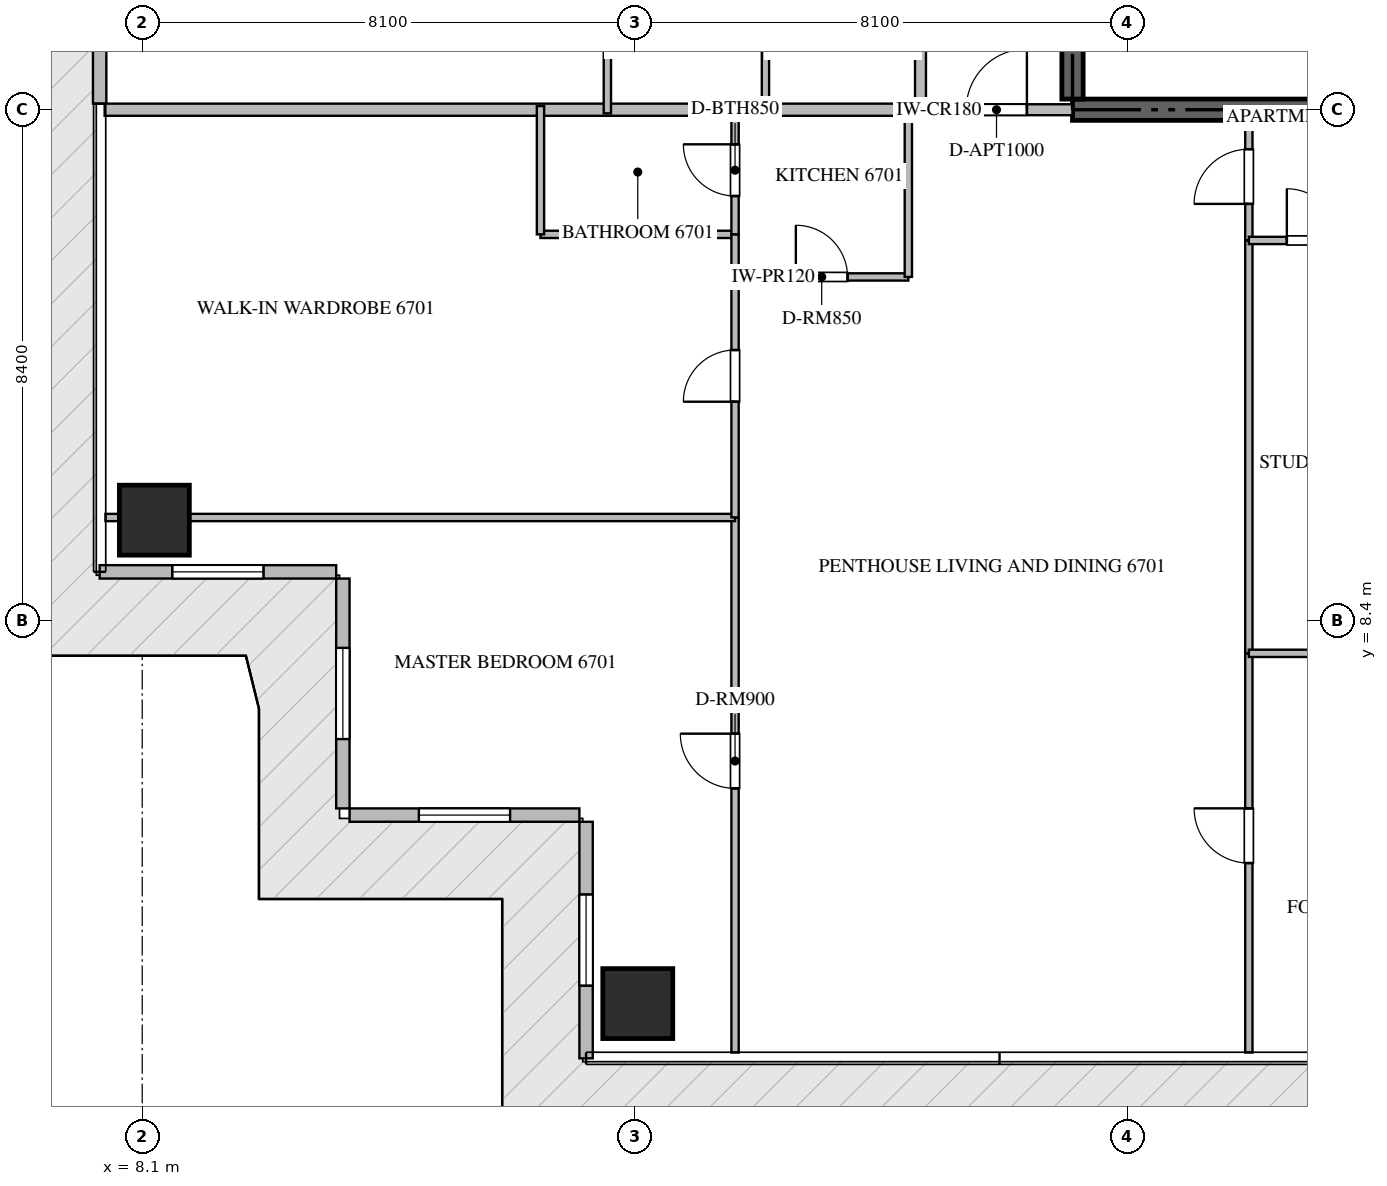
"""IFC4 building model, lengths in metres.
Left out: names, types, materials, properties, quantities, classifications, styles, units other than length and angle.
Written with IfcOpenShell. Run it as: python <this file> out.ifc"""

import sys

from ifc_helpers import new_model, si_unit, direction, frame, frame_2d, origin, origin_2d, place, context, subcontext, project, spatial, rectangle, extrude, source, transform, mapped, element, fill, save


model = new_model("IFC4")
c1 = context("Model", 3, precision=1e-05, world=origin(), true_north=direction((0.0, 1.0)))
c2 = subcontext(c1, "Body", "Model", "MODEL_VIEW")
j1 = project(units=[si_unit("LENGTHUNIT", "METRE"), si_unit("PLANEANGLEUNIT", "RADIAN")], contexts=[c1])
p1 = place(None, origin())
s1 = spatial("IfcSite", under=j1, at=p1, CompositionType="ELEMENT")
p2 = place(p1, origin())
s2 = spatial("IfcBuilding", under=s1, at=p2, CompositionType="ELEMENT")
p3 = place(p2, frame((0.0, 0.0, 268.2)))
s3 = spatial("IfcBuildingStorey", under=s2, at=p3, CompositionType="ELEMENT", Elevation=268.2)
p4 = place(p3, frame((23.4, 16.8, -0.26), z_axis=(0.0, 0.0, 1.0), x_axis=(1.0, 0.0, 0.0)))
e1 = element("IfcWall", 1, at=p4, inside=s3, PredefinedType="SHEAR", context=c2, shape_type="SweptSolid", body=[
    extrude(rectangle(XDim=18.0, YDim=0.35, at=frame_2d((9.0, 0.0))), origin(), (0.0, 0.0, 1.0), 3.848),
])
p5 = place(p3, frame((23.4, 16.975, -0.26), z_axis=(0.0, 0.0, 1.0), x_axis=(0.0, 1.0, 0.0)))
e2 = element("IfcWall", 2, at=p5, inside=s3, PredefinedType="SHEAR", context=c2, shape_type="SweptSolid", body=[
    extrude(rectangle(XDim=4.875, YDim=0.35, at=frame_2d((2.438, 0.0))), origin(), (0.0, 0.0, 1.0), 3.848),
])
m1 = source(origin(), c2, "Body", "SweptSolid", [
    extrude(rectangle(XDim=1.15, YDim=1.15, at=origin_2d()), origin(), (0.0, 0.0, 1.0), 3.85),
])
for number, where, z_axis, x_axis in (
    (3, (16.25, 2.1, -0.26), (0.0, 0.0, 1.0), (1.0, 0.0, 0.0)),
    (4, (8.3, 10.05, -0.26), (0.0, 0.0, 1.0), (1.0, 0.0, 0.0)),
):
    element("IfcColumn", number, at=place(p3, frame(where, z_axis=z_axis, x_axis=x_axis)), inside=s3, PredefinedType="COLUMN", context=c2, shape_type="MappedRepresentation", body=[
        mapped(m1, transform((0.0, 0.0, 0.0), scale=1.0)),
    ])
p6 = place(p3, frame((7.4, 19.9, 0.0), z_axis=(0.0, 0.0, 1.0), x_axis=(0.0, -1.0, 0.0)))
e5 = element("IfcWall", 5, at=p6, inside=s3, PredefinedType="ELEMENTEDWALL", context=c2, shape_type="SweptSolid", body=[
    extrude(rectangle(XDim=3.0, YDim=0.22, at=frame_2d((1.5, 0.0))), origin(), (0.0, 0.0, 1.0), 3.575),
])
p7 = place(p6, frame((0.95, 0.0, 0.0)))
e6 = element("IfcOpeningElement", 6, at=p7, cuts=e5, PredefinedType="OPENING", context=c2, shape_type="SweptSolid", body=[
    extrude(rectangle(XDim=1.1, YDim=2.2, at=frame_2d((0.55, 1.1))), frame((0.0, 0.12, 0.0), z_axis=(0.0, -1.0, 0.0), x_axis=(1.0, 0.0, 0.0)), (0.0, 0.0, 1.0), 0.24),
])
p8 = place(p3, frame((7.4, 9.2, 0.0), z_axis=(0.0, 0.0, 1.0), x_axis=(1.0, 0.0, 0.0)))
e7 = element("IfcWall", 7, at=p8, inside=s3, PredefinedType="ELEMENTEDWALL", context=c2, shape_type="SweptSolid", body=[
    extrude(rectangle(XDim=3.89, YDim=0.22, at=frame_2d((1.945, 0.0))), origin(), (0.0, 0.0, 1.0), 3.575),
])
p9 = place(p8, frame((1.195, 0.0, 0.65)))
e8 = element("IfcOpeningElement", 8, at=p9, cuts=e7, PredefinedType="OPENING", context=c2, shape_type="SweptSolid", body=[
    extrude(rectangle(XDim=1.5, YDim=2.25, at=frame_2d((0.75, 1.125))), frame((0.0, 0.12, 0.0), z_axis=(0.0, -1.0, 0.0), x_axis=(1.0, 0.0, 0.0)), (0.0, 0.0, 1.0), 0.24),
])
p10 = place(p3, frame((11.4, 9.09, 0.0), z_axis=(0.0, 0.0, 1.0), x_axis=(0.0, -1.0, 0.0)))
e9 = element("IfcWall", 9, at=p10, inside=s3, PredefinedType="ELEMENTEDWALL", context=c2, shape_type="SweptSolid", body=[
    extrude(rectangle(XDim=3.78, YDim=0.22, at=frame_2d((1.89, 0.0))), origin(), (0.0, 0.0, 1.0), 3.575),
])
p11 = place(p10, frame((1.14, 0.0, 0.65)))
e10 = element("IfcOpeningElement", 10, at=p11, cuts=e9, PredefinedType="OPENING", context=c2, shape_type="SweptSolid", body=[
    extrude(rectangle(XDim=1.5, YDim=2.25, at=frame_2d((0.75, 1.125))), frame((0.0, 0.12, 0.0), z_axis=(0.0, -1.0, 0.0), x_axis=(1.0, 0.0, 0.0)), (0.0, 0.0, 1.0), 0.24),
])
p12 = place(p3, frame((11.51, 5.2, 0.0), z_axis=(0.0, 0.0, 1.0), x_axis=(1.0, 0.0, 0.0)))
e11 = element("IfcWall", 11, at=p12, inside=s3, PredefinedType="ELEMENTEDWALL", context=c2, shape_type="SweptSolid", body=[
    extrude(rectangle(XDim=3.78, YDim=0.22, at=frame_2d((1.89, 0.0))), origin(), (0.0, 0.0, 1.0), 3.575),
])
p13 = place(p12, frame((1.14, 0.0, 0.65)))
e12 = element("IfcOpeningElement", 12, at=p13, cuts=e11, PredefinedType="OPENING", context=c2, shape_type="SweptSolid", body=[
    extrude(rectangle(XDim=1.5, YDim=2.25, at=frame_2d((0.75, 1.125))), frame((0.0, 0.12, 0.0), z_axis=(0.0, -1.0, 0.0), x_axis=(1.0, 0.0, 0.0)), (0.0, 0.0, 1.0), 0.24),
])
p14 = place(p3, frame((15.4, 5.09, 0.0), z_axis=(0.0, 0.0, 1.0), x_axis=(0.0, -1.0, 0.0)))
e13 = element("IfcWall", 13, at=p14, inside=s3, PredefinedType="ELEMENTEDWALL", context=c2, shape_type="SweptSolid", body=[
    extrude(rectangle(XDim=3.89, YDim=0.22, at=frame_2d((1.945, 0.0))), origin(), (0.0, 0.0, 1.0), 3.575),
])
p15 = place(p14, frame((1.195, 0.0, 0.65)))
e14 = element("IfcOpeningElement", 14, at=p15, cuts=e13, PredefinedType="OPENING", context=c2, shape_type="SweptSolid", body=[
    extrude(rectangle(XDim=1.5, YDim=2.25, at=frame_2d((0.75, 1.125))), frame((0.0, 0.12, 0.0), z_axis=(0.0, -1.0, 0.0), x_axis=(1.0, 0.0, 0.0)), (0.0, 0.0, 1.0), 0.24),
])
p16 = place(p3, frame((7.482, 16.8, 0.0), z_axis=(0.0, 0.0, 1.0), x_axis=(1.0, 0.0, 0.0)))
e15 = element("IfcWall", 15, at=p16, inside=s3, PredefinedType="PARTITIONING", context=c2, shape_type="SweptSolid", body=[
    extrude(rectangle(XDim=13.418, YDim=0.2, at=frame_2d((6.709, 0.0))), origin(), (0.0, 0.0, 1.0), 3.59),
])
p17 = place(p3, frame((20.902, 16.8, 0.0), z_axis=(0.0, 0.0, 1.0), x_axis=(1.0, 0.0, 0.0)))
e16 = element("IfcWall", 16, at=p17, inside=s3, PredefinedType="PARTITIONING", context=c2, shape_type="SweptSolid", body=[
    extrude(rectangle(XDim=2.496, YDim=0.18, at=frame_2d((1.248, 0.0))), origin(), (0.0, 0.0, 1.0), 3.59),
])
p18 = place(p17, frame((0.748, 0.0, 0.0)))
e17 = element("IfcOpeningElement", 17, at=p18, cuts=e16, PredefinedType="OPENING", context=c2, shape_type="SweptSolid", body=[
    extrude(rectangle(XDim=1.0, YDim=2.15, at=frame_2d((0.5, 1.075))), frame((0.0, 0.1, 0.0), z_axis=(0.0, -1.0, 0.0), x_axis=(1.0, 0.0, 0.0)), (0.0, 0.0, 1.0), 0.2),
])
p19 = place(p3, frame((20.9, 16.8, 0.0), z_axis=(0.0, 0.0, 1.0), x_axis=(0.0, 1.0, 0.0)))
e18 = element("IfcWall", 18, at=p19, inside=s3, PredefinedType="PARTITIONING", context=c2, shape_type="SweptSolid", body=[
    extrude(rectangle(XDim=16.8, YDim=0.18, at=frame_2d((8.4, 0.0))), origin(), (0.0, 0.0, 1.0), 3.59),
])
p20 = place(p19, frame((4.503, 0.0, 0.0)))
e19 = element("IfcOpeningElement", 19, at=p20, cuts=e18, PredefinedType="OPENING", context=c2, shape_type="SweptSolid", body=[
    extrude(rectangle(XDim=1.0, YDim=2.15, at=frame_2d((0.5, 1.075))), frame((0.0, 0.1, 0.0), z_axis=(0.0, -1.0, 0.0), x_axis=(1.0, 0.0, 0.0)), (0.0, 0.0, 1.0), 0.2),
])
p21 = place(p19, frame((8.706, 0.0, 0.0)))
e20 = element("IfcOpeningElement", 20, at=p21, cuts=e18, PredefinedType="OPENING", context=c2, shape_type="SweptSolid", body=[
    extrude(rectangle(XDim=1.0, YDim=2.15, at=frame_2d((0.5, 1.075))), frame((0.0, 0.1, 0.0), z_axis=(0.0, -1.0, 0.0), x_axis=(1.0, 0.0, 0.0)), (0.0, 0.0, 1.0), 0.2),
])
p22 = place(p3, frame((17.85, 14.05, 0.0), z_axis=(0.0, 0.0, 1.0), x_axis=(1.0, 0.0, 0.0)))
e21 = element("IfcWall", 21, at=p22, inside=s3, PredefinedType="PARTITIONING", context=c2, shape_type="SweptSolid", body=[
    extrude(rectangle(XDim=2.85, YDim=0.12, at=frame_2d((1.425, 0.0))), origin(), (0.0, 0.0, 1.0), 3.59),
])
p23 = place(p22, frame((1.0, 0.0, 0.0)))
e22 = element("IfcOpeningElement", 22, at=p23, cuts=e21, PredefinedType="OPENING", context=c2, shape_type="SweptSolid", body=[
    extrude(rectangle(XDim=0.85, YDim=2.1, at=frame_2d((0.425, 1.05))), frame((0.0, 0.07, 0.0), z_axis=(0.0, -1.0, 0.0), x_axis=(1.0, 0.0, 0.0)), (0.0, 0.0, 1.0), 0.14),
])
p24 = place(p3, frame((20.7, 14.05, 0.0), z_axis=(0.0, 0.0, 1.0), x_axis=(0.0, 1.0, 0.0)))
e23 = element("IfcWall", 23, at=p24, inside=s3, PredefinedType="PARTITIONING", context=c2, shape_type="SweptSolid", body=[
    extrude(rectangle(XDim=2.81, YDim=0.12, at=frame_2d((1.405, 0.0))), origin(), (0.0, 0.0, 1.0), 3.59),
])
p25 = place(p3, frame((17.85, 1.295, 0.0), z_axis=(0.0, 0.0, 1.0), x_axis=(0.0, 1.0, 0.0)))
e24 = element("IfcWall", 24, at=p25, inside=s3, PredefinedType="PARTITIONING", context=c2, shape_type="SweptSolid", body=[
    extrude(rectangle(XDim=8.799, YDim=0.12, at=frame_2d((4.399, 0.0))), origin(), (0.0, 0.0, 1.0), 3.59),
])
p26 = place(p25, frame((4.344, 0.0, 0.0)))
e25 = element("IfcOpeningElement", 25, at=p26, cuts=e24, PredefinedType="OPENING", context=c2, shape_type="SweptSolid", body=[
    extrude(rectangle(XDim=0.9, YDim=2.1, at=frame_2d((0.45, 1.05))), frame((0.0, 0.07, 0.0), z_axis=(0.0, -1.0, 0.0), x_axis=(1.0, 0.0, 0.0)), (0.0, 0.0, 1.0), 0.14),
])
p27 = place(p3, frame((7.495, 10.094, 0.0), z_axis=(0.0, 0.0, 1.0), x_axis=(1.0, 0.0, 0.0)))
e26 = element("IfcWall", 26, at=p27, inside=s3, PredefinedType="PARTITIONING", context=c2, shape_type="SweptSolid", body=[
    extrude(rectangle(XDim=10.355, YDim=0.12, at=frame_2d((5.177, 0.0))), origin(), (0.0, 0.0, 1.0), 3.122),
])
p28 = place(p3, frame((14.65, 14.75, 0.0), z_axis=(0.0, 0.0, 1.0), x_axis=(1.0, 0.0, 0.0)))
e27 = element("IfcWall", 27, at=p28, inside=s3, PredefinedType="PARTITIONING", context=c2, shape_type="SweptSolid", body=[
    extrude(rectangle(XDim=3.2, YDim=0.12, at=frame_2d((1.6, 0.0))), origin(), (0.0, 0.0, 1.0), 3.59),
])
p29 = place(p3, frame((14.65, 14.75, 0.0), z_axis=(0.0, 0.0, 1.0), x_axis=(0.0, 1.0, 0.0)))
e28 = element("IfcWall", 28, at=p29, inside=s3, PredefinedType="PARTITIONING", context=c2, shape_type="SweptSolid", body=[
    extrude(rectangle(XDim=2.11, YDim=0.12, at=frame_2d((1.055, 0.0))), origin(), (0.0, 0.0, 1.0), 3.59),
])
p30 = place(p3, frame((17.85, 10.096, 0.0), z_axis=(0.0, 0.0, 1.0), x_axis=(0.0, 1.0, 0.0)))
e29 = element("IfcWall", 29, at=p30, inside=s3, PredefinedType="PARTITIONING", context=c2, shape_type="SweptSolid", body=[
    extrude(rectangle(XDim=4.654, YDim=0.12, at=frame_2d((2.327, 0.0))), origin(), (0.0, 0.0, 1.0), 3.59),
])
p31 = place(p30, frame((1.902, 0.0, 0.0)))
e30 = element("IfcOpeningElement", 30, at=p31, cuts=e29, PredefinedType="OPENING", context=c2, shape_type="SweptSolid", body=[
    extrude(rectangle(XDim=0.85, YDim=2.1, at=frame_2d((0.425, 1.05))), frame((0.0, 0.07, 0.0), z_axis=(0.0, -1.0, 0.0), x_axis=(1.0, 0.0, 0.0)), (0.0, 0.0, 1.0), 0.14),
])
p32 = place(p3, frame((17.85, 14.752, 0.0), z_axis=(0.0, 0.0, 1.0), x_axis=(0.0, 1.0, 0.0)))
e31 = element("IfcWall", 31, at=p32, inside=s3, PredefinedType="PARTITIONING", context=c2, shape_type="SweptSolid", body=[
    extrude(rectangle(XDim=2.108, YDim=0.12, at=frame_2d((1.054, 0.0))), origin(), (0.0, 0.0, 1.0), 3.59),
])
p33 = place(p32, frame((0.629, 0.0, 0.0)))
e32 = element("IfcOpeningElement", 32, at=p33, cuts=e31, PredefinedType="OPENING", context=c2, shape_type="SweptSolid", body=[
    extrude(rectangle(XDim=0.85, YDim=2.1, at=frame_2d((0.425, 1.05))), frame((0.0, 0.07, 0.0), z_axis=(0.0, -1.0, 0.0), x_axis=(1.0, 0.0, 0.0)), (0.0, 0.0, 1.0), 0.14),
])
p34 = place(p3, frame((26.3, 14.65, 0.0), z_axis=(0.0, 0.0, 1.0), x_axis=(0.0, 1.0, 0.0)))
e33 = element("IfcWall", 33, at=p34, inside=s3, PredefinedType="PARTITIONING", context=c2, shape_type="SweptSolid", body=[
    extrude(rectangle(XDim=1.975, YDim=0.12, at=frame_2d((0.988, 0.0))), origin(), (0.0, 0.0, 1.0), 3.59),
])
p35 = place(p34, frame((0.601, 0.0, 0.0)))
e34 = element("IfcOpeningElement", 34, at=p35, cuts=e33, PredefinedType="OPENING", context=c2, shape_type="SweptSolid", body=[
    extrude(rectangle(XDim=0.9, YDim=2.1, at=frame_2d((0.45, 1.05))), frame((0.0, 0.07, 0.0), z_axis=(0.0, -1.0, 0.0), x_axis=(1.0, 0.0, 0.0)), (0.0, 0.0, 1.0), 0.14),
])
p36 = place(p3, frame((26.3, 1.295, 0.0), z_axis=(0.0, 0.0, 1.0), x_axis=(0.0, 1.0, 0.0)))
e35 = element("IfcWall", 35, at=p36, inside=s3, PredefinedType="PARTITIONING", context=c2, shape_type="SweptSolid", body=[
    extrude(rectangle(XDim=6.565, YDim=0.12, at=frame_2d((3.283, 0.0))), origin(), (0.0, 0.0, 1.0), 3.59),
])
p37 = place(p36, frame((3.116, 0.0, 0.0)))
e36 = element("IfcOpeningElement", 36, at=p37, cuts=e35, PredefinedType="OPENING", context=c2, shape_type="SweptSolid", body=[
    extrude(rectangle(XDim=0.9, YDim=2.1, at=frame_2d((0.45, 1.05))), frame((0.0, 0.07, 0.0), z_axis=(0.0, -1.0, 0.0), x_axis=(1.0, 0.0, 0.0)), (0.0, 0.0, 1.0), 0.14),
])
p38 = place(p3, frame((26.3, 7.862, 0.0), z_axis=(0.0, 0.0, 1.0), x_axis=(0.0, 1.0, 0.0)))
e37 = element("IfcWall", 37, at=p38, inside=s3, PredefinedType="PARTITIONING", context=c2, shape_type="SweptSolid", body=[
    extrude(rectangle(XDim=6.786, YDim=0.12, at=frame_2d((3.393, 0.0))), origin(), (0.0, 0.0, 1.0), 3.59),
])
p39 = place(p3, frame((26.3, 7.86, 0.0), z_axis=(0.0, 0.0, 1.0), x_axis=(1.0, 0.0, 0.0)))
e38 = element("IfcWall", 38, at=p39, inside=s3, PredefinedType="PARTITIONING", context=c2, shape_type="SweptSolid", body=[
    extrude(rectangle(XDim=5.15, YDim=0.12, at=frame_2d((2.575, 0.0))), origin(), (0.0, 0.0, 1.0), 3.59),
])
p40 = place(p3, frame((26.3, 14.65, 0.0), z_axis=(0.0, 0.0, 1.0), x_axis=(1.0, 0.0, 0.0)))
e39 = element("IfcWall", 39, at=p40, inside=s3, PredefinedType="PARTITIONING", context=c2, shape_type="SweptSolid", body=[
    extrude(rectangle(XDim=2.1, YDim=0.12, at=frame_2d((1.05, 0.0))), origin(), (0.0, 0.0, 1.0), 3.59),
])
p41 = place(p40, frame((0.625, 0.0, 0.0)))
e40 = element("IfcOpeningElement", 40, at=p41, cuts=e39, PredefinedType="OPENING", context=c2, shape_type="SweptSolid", body=[
    extrude(rectangle(XDim=0.85, YDim=2.1, at=frame_2d((0.425, 1.05))), frame((0.0, 0.07, 0.0), z_axis=(0.0, -1.0, 0.0), x_axis=(1.0, 0.0, 0.0)), (0.0, 0.0, 1.0), 0.14),
])
for number, where, z_axis, x_axis in (
    (41, (18.35, 16.74, 0.0), (0.0, 0.0, 1.0), (0.0, 1.0, 0.0)),
    (42, (15.75, 16.74, 0.0), (0.0, 0.0, 1.0), (0.0, 1.0, 0.0)),
):
    element("IfcWall", number, at=place(p3, frame(where, z_axis=z_axis, x_axis=x_axis)), inside=s3, PredefinedType="PARTITIONING", context=c2, shape_type="SweptSolid", body=[
        extrude(rectangle(XDim=2.66, YDim=0.12, at=frame_2d((1.33, 0.0))), origin(), (0.0, 0.0, 1.0), 3.59),
    ])
m2 = source(origin(), c2, "Body", "SweptSolid", [
    extrude(rectangle(XDim=1.5, YDim=2.25, at=frame_2d((0.75, 1.125))), frame((0.0, 0.03, 0.0), z_axis=(0.0, -1.0, 0.0), x_axis=(1.0, 0.0, 0.0)), (0.0, 0.0, 1.0), 0.06),
])
p42 = place(p9, origin())
e43 = element("IfcWindow", 43, at=p42, inside=s3, PartitioningType="SINGLE_PANEL", PredefinedType="WINDOW", context=c2, shape_type="MappedRepresentation", body=[
    mapped(m2, transform((0.0, 0.0, 0.0), scale=1.0)),
])
fill(e8, e43)
p43 = place(p11, origin())
e44 = element("IfcWindow", 44, at=p43, inside=s3, PartitioningType="SINGLE_PANEL", PredefinedType="WINDOW", context=c2, shape_type="MappedRepresentation", body=[
    mapped(m2, transform((0.0, 0.0, 0.0), scale=1.0)),
])
fill(e10, e44)
p44 = place(p13, origin())
e45 = element("IfcWindow", 45, at=p44, inside=s3, PartitioningType="SINGLE_PANEL", PredefinedType="WINDOW", context=c2, shape_type="MappedRepresentation", body=[
    mapped(m2, transform((0.0, 0.0, 0.0), scale=1.0)),
])
fill(e12, e45)
p45 = place(p15, origin())
e46 = element("IfcWindow", 46, at=p45, inside=s3, PartitioningType="SINGLE_PANEL", PredefinedType="WINDOW", context=c2, shape_type="MappedRepresentation", body=[
    mapped(m2, transform((0.0, 0.0, 0.0), scale=1.0)),
])
fill(e14, e46)
m3 = source(origin(), c2, "Body", "SweptSolid", [
    extrude(rectangle(XDim=1.0, YDim=2.15, at=frame_2d((0.5, 1.075))), frame((0.0, 0.025, 0.0), z_axis=(0.0, -1.0, 0.0), x_axis=(1.0, 0.0, 0.0)), (0.0, 0.0, 1.0), 0.05),
])
p46 = place(p18, origin())
e47 = element("IfcDoor", 47, at=p46, inside=s3, OperationType="SINGLE_SWING_RIGHT", PredefinedType="DOOR", context=c2, shape_type="MappedRepresentation", body=[
    mapped(m3, transform((0.0, 0.0, 0.0), scale=1.0)),
])
fill(e17, e47)
m4 = source(origin(), c2, "Body", "SweptSolid", [
    extrude(rectangle(XDim=0.85, YDim=2.1, at=frame_2d((0.425, 1.05))), frame((0.0, 0.025, 0.0), z_axis=(0.0, -1.0, 0.0), x_axis=(1.0, 0.0, 0.0)), (0.0, 0.0, 1.0), 0.05),
])
p47 = place(p23, origin())
e48 = element("IfcDoor", 48, at=p47, inside=s3, OperationType="SINGLE_SWING_LEFT", PredefinedType="DOOR", context=c2, shape_type="MappedRepresentation", body=[
    mapped(m4, transform((0.0, 0.0, 0.0), scale=1.0)),
])
fill(e22, e48)
m5 = source(origin(), c2, "Body", "SweptSolid", [
    extrude(rectangle(XDim=0.9, YDim=2.1, at=frame_2d((0.45, 1.05))), frame((0.0, 0.025, 0.0), z_axis=(0.0, -1.0, 0.0), x_axis=(1.0, 0.0, 0.0)), (0.0, 0.0, 1.0), 0.05),
])
p48 = place(p26, origin())
e49 = element("IfcDoor", 49, at=p48, inside=s3, OperationType="SINGLE_SWING_RIGHT", PredefinedType="DOOR", context=c2, shape_type="MappedRepresentation", body=[
    mapped(m5, transform((0.0, 0.0, 0.0), scale=1.0)),
])
fill(e25, e49)
p49 = place(p31, origin())
e50 = element("IfcDoor", 50, at=p49, inside=s3, OperationType="SINGLE_SWING_LEFT", PredefinedType="DOOR", context=c2, shape_type="MappedRepresentation", body=[
    mapped(m4, transform((0.0, 0.0, 0.0), scale=1.0)),
])
fill(e30, e50)
p50 = place(p33, origin())
e51 = element("IfcDoor", 51, at=p50, inside=s3, OperationType="SINGLE_SWING_RIGHT", PredefinedType="DOOR", context=c2, shape_type="MappedRepresentation", body=[
    mapped(m4, transform((0.0, 0.0, 0.0), scale=1.0)),
])
fill(e32, e51)
p51 = place(p35, origin())
e52 = element("IfcDoor", 52, at=p51, inside=s3, OperationType="SINGLE_SWING_LEFT", PredefinedType="DOOR", context=c2, shape_type="MappedRepresentation", body=[
    mapped(m5, transform((0.0, 0.0, 0.0), scale=1.0)),
])
fill(e34, e52)
p52 = place(p37, origin())
e53 = element("IfcDoor", 53, at=p52, inside=s3, OperationType="SINGLE_SWING_RIGHT", PredefinedType="DOOR", context=c2, shape_type="MappedRepresentation", body=[
    mapped(m5, transform((0.0, 0.0, 0.0), scale=1.0)),
])
fill(e36, e53)
p53 = place(p41, origin())
e54 = element("IfcDoor", 54, at=p53, inside=s3, OperationType="SINGLE_SWING_LEFT", PredefinedType="DOOR", context=c2, shape_type="MappedRepresentation", body=[
    mapped(m4, transform((0.0, 0.0, 0.0), scale=1.0)),
])
fill(e40, e54)
save(model, sys.argv[1])
